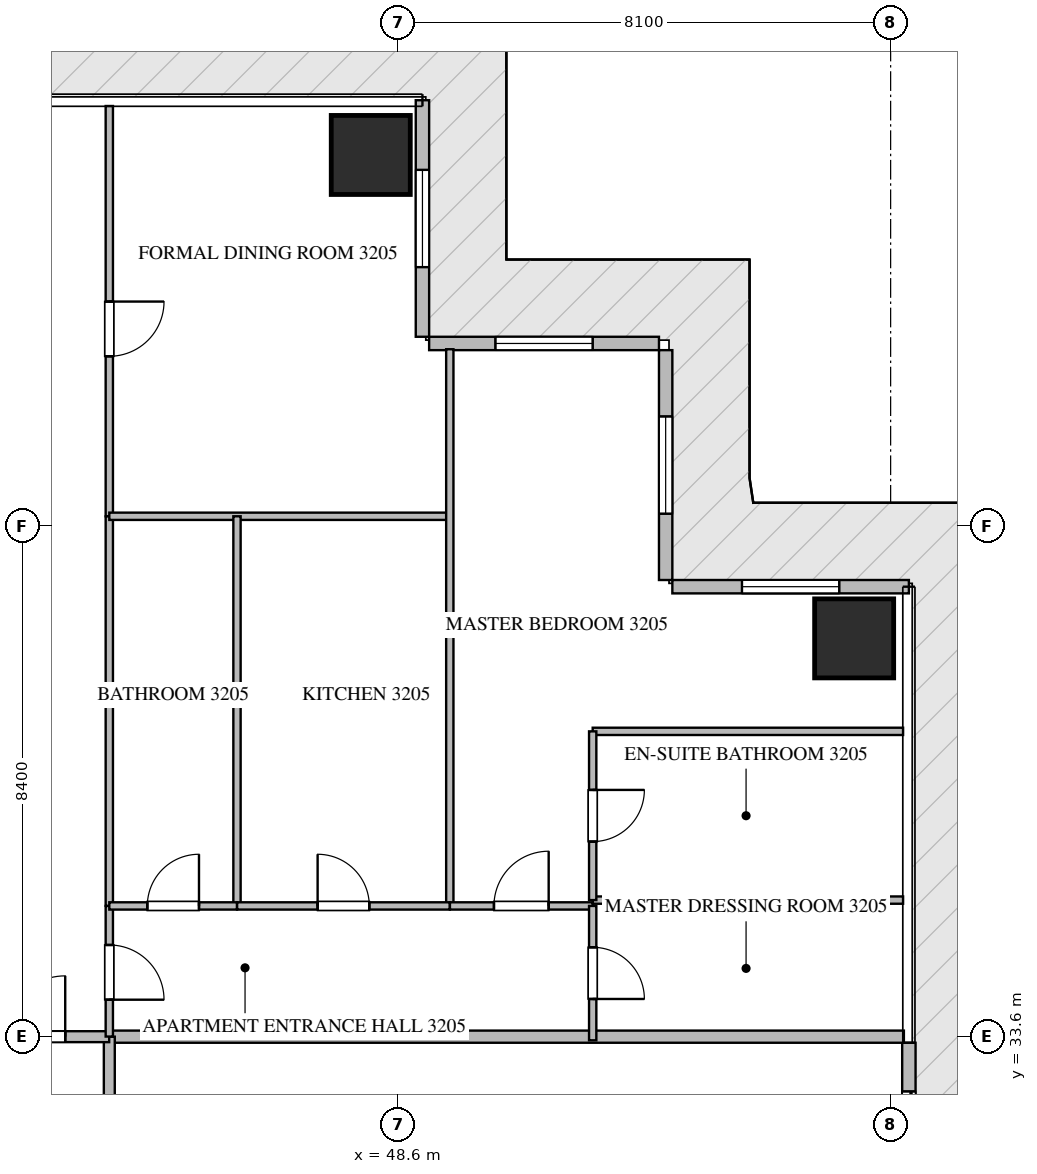
"""IFC4 building model, lengths in metres.
Left out: names, types, materials, properties, quantities, classifications, styles, units other than length and angle.
Written with IfcOpenShell. Run it as: python <this file> out.ifc"""

import sys

from ifc_helpers import new_model, si_unit, direction, frame, frame_2d, origin, origin_2d, place, context, subcontext, project, spatial, rectangle, extrude, source, transform, mapped, element, fill, save


model = new_model("IFC4")
c1 = context("Model", 3, precision=1e-05, world=origin(), true_north=direction((0.0, 1.0)))
c2 = subcontext(c1, "Body", "Model", "MODEL_VIEW")
j1 = project(units=[si_unit("LENGTHUNIT", "METRE"), si_unit("PLANEANGLEUNIT", "RADIAN")], contexts=[c1])
p1 = place(None, origin())
s1 = spatial("IfcSite", under=j1, at=p1, CompositionType="ELEMENT")
p2 = place(p1, origin())
s2 = spatial("IfcBuilding", under=s1, at=p2, CompositionType="ELEMENT")
p3 = place(p2, frame((0.0, 0.0, 131.4)))
s3 = spatial("IfcBuildingStorey", under=s2, at=p3, CompositionType="ELEMENT", Elevation=131.4)
m1 = source(origin(), c2, "Body", "SweptSolid", [
    extrude(rectangle(XDim=1.3, YDim=1.3, at=origin_2d()), origin(), (0.0, 0.0, 1.0), 3.75),
])
for number, where, z_axis, x_axis in (
    (1, (48.15, 48.1, -0.26), (0.0, 0.0, 1.0), (1.0, 0.0, 0.0)),
    (2, (56.1, 40.15, -0.26), (0.0, 0.0, 1.0), (1.0, 0.0, 0.0)),
):
    element("IfcColumn", number, at=place(p3, frame(where, z_axis=z_axis, x_axis=x_axis)), inside=s3, PredefinedType="COLUMN", context=c2, shape_type="MappedRepresentation", body=[
        mapped(m1, transform((0.0, 0.0, 0.0), scale=1.0)),
    ])
p4 = place(p3, frame((57.0, 30.5, 0.0), z_axis=(0.0, 0.0, 1.0), x_axis=(0.0, 1.0, 0.0)))
e3 = element("IfcWall", 3, at=p4, inside=s3, PredefinedType="ELEMENTEDWALL", context=c2, shape_type="SweptSolid", body=[
    extrude(rectangle(XDim=3.0, YDim=0.22, at=frame_2d((1.5, 0.0))), origin(), (0.0, 0.0, 1.0), 3.475),
])
p5 = place(p4, frame((0.8, 0.0, 0.0)))
e4 = element("IfcOpeningElement", 4, at=p5, cuts=e3, PredefinedType="OPENING", context=c2, shape_type="SweptSolid", body=[
    extrude(rectangle(XDim=1.4, YDim=2.25, at=frame_2d((0.7, 1.125))), frame((0.0, 0.12, 0.0), z_axis=(0.0, -1.0, 0.0), x_axis=(1.0, 0.0, 0.0)), (0.0, 0.0, 1.0), 0.24),
])
p6 = place(p3, frame((57.0, 41.0, 0.0), z_axis=(0.0, 0.0, 1.0), x_axis=(-1.0, 0.0, 0.0)))
e5 = element("IfcWall", 5, at=p6, inside=s3, PredefinedType="ELEMENTEDWALL", context=c2, shape_type="SweptSolid", body=[
    extrude(rectangle(XDim=3.89, YDim=0.22, at=frame_2d((1.945, 0.0))), origin(), (0.0, 0.0, 1.0), 3.475),
])
p7 = place(p6, frame((1.145, 0.0, 0.65)))
e6 = element("IfcOpeningElement", 6, at=p7, cuts=e5, PredefinedType="OPENING", context=c2, shape_type="SweptSolid", body=[
    extrude(rectangle(XDim=1.6, YDim=2.1, at=frame_2d((0.8, 1.05))), frame((0.0, 0.12, 0.0), z_axis=(0.0, -1.0, 0.0), x_axis=(1.0, 0.0, 0.0)), (0.0, 0.0, 1.0), 0.24),
])
p8 = place(p3, frame((53.0, 41.11, 0.0), z_axis=(0.0, 0.0, 1.0), x_axis=(0.0, 1.0, 0.0)))
e7 = element("IfcWall", 7, at=p8, inside=s3, PredefinedType="ELEMENTEDWALL", context=c2, shape_type="SweptSolid", body=[
    extrude(rectangle(XDim=3.78, YDim=0.22, at=frame_2d((1.89, 0.0))), origin(), (0.0, 0.0, 1.0), 3.475),
])
p9 = place(p8, frame((1.09, 0.0, 0.65)))
e8 = element("IfcOpeningElement", 8, at=p9, cuts=e7, PredefinedType="OPENING", context=c2, shape_type="SweptSolid", body=[
    extrude(rectangle(XDim=1.6, YDim=2.1, at=frame_2d((0.8, 1.05))), frame((0.0, 0.12, 0.0), z_axis=(0.0, -1.0, 0.0), x_axis=(1.0, 0.0, 0.0)), (0.0, 0.0, 1.0), 0.24),
])
p10 = place(p3, frame((52.89, 45.0, 0.0), z_axis=(0.0, 0.0, 1.0), x_axis=(-1.0, 0.0, 0.0)))
e9 = element("IfcWall", 9, at=p10, inside=s3, PredefinedType="ELEMENTEDWALL", context=c2, shape_type="SweptSolid", body=[
    extrude(rectangle(XDim=3.78, YDim=0.22, at=frame_2d((1.89, 0.0))), origin(), (0.0, 0.0, 1.0), 3.475),
])
p11 = place(p10, frame((1.09, 0.0, 0.65)))
e10 = element("IfcOpeningElement", 10, at=p11, cuts=e9, PredefinedType="OPENING", context=c2, shape_type="SweptSolid", body=[
    extrude(rectangle(XDim=1.6, YDim=2.1, at=frame_2d((0.8, 1.05))), frame((0.0, 0.12, 0.0), z_axis=(0.0, -1.0, 0.0), x_axis=(1.0, 0.0, 0.0)), (0.0, 0.0, 1.0), 0.24),
])
p12 = place(p3, frame((49.0, 45.11, 0.0), z_axis=(0.0, 0.0, 1.0), x_axis=(0.0, 1.0, 0.0)))
e11 = element("IfcWall", 11, at=p12, inside=s3, PredefinedType="ELEMENTEDWALL", context=c2, shape_type="SweptSolid", body=[
    extrude(rectangle(XDim=3.89, YDim=0.22, at=frame_2d((1.945, 0.0))), origin(), (0.0, 0.0, 1.0), 3.475),
])
p13 = place(p12, frame((1.145, 0.0, 0.65)))
e12 = element("IfcOpeningElement", 12, at=p13, cuts=e11, PredefinedType="OPENING", context=c2, shape_type="SweptSolid", body=[
    extrude(rectangle(XDim=1.6, YDim=2.1, at=frame_2d((0.8, 1.05))), frame((0.0, 0.12, 0.0), z_axis=(0.0, -1.0, 0.0), x_axis=(1.0, 0.0, 0.0)), (0.0, 0.0, 1.0), 0.24),
])
p14 = place(p3, frame((43.85, 33.6, 0.0), z_axis=(0.0, 0.0, 1.0), x_axis=(1.0, 0.0, 0.0)))
e13 = element("IfcWall", 13, at=p14, inside=s3, PredefinedType="PARTITIONING", context=c2, shape_type="SweptSolid", body=[
    extrude(rectangle(XDim=13.068, YDim=0.2, at=frame_2d((6.534, 0.0))), origin(), (0.0, 0.0, 1.0), 3.49),
])
p15 = place(p3, frame((43.85, 14.9, 0.0), z_axis=(0.0, 0.0, 1.0), x_axis=(0.0, 1.0, 0.0)))
e14 = element("IfcWall", 14, at=p15, inside=s3, PredefinedType="PARTITIONING", context=c2, shape_type="SweptSolid", body=[
    extrude(rectangle(XDim=18.7, YDim=0.18, at=frame_2d((9.35, 0.0))), origin(), (0.0, 0.0, 1.0), 3.49),
])
p16 = place(p15, frame((6.708, 0.0, 0.0)))
e15 = element("IfcOpeningElement", 15, at=p16, cuts=e14, PredefinedType="OPENING", context=c2, shape_type="SweptSolid", body=[
    extrude(rectangle(XDim=1.0, YDim=2.15, at=frame_2d((0.5, 1.075))), frame((0.0, 0.1, 0.0), z_axis=(0.0, -1.0, 0.0), x_axis=(1.0, 0.0, 0.0)), (0.0, 0.0, 1.0), 0.2),
])
p17 = place(p15, frame((15.134, 0.0, 0.0)))
e16 = element("IfcOpeningElement", 16, at=p17, cuts=e14, PredefinedType="OPENING", context=c2, shape_type="SweptSolid", body=[
    extrude(rectangle(XDim=1.0, YDim=2.15, at=frame_2d((0.5, 1.075))), frame((0.0, 0.1, 0.0), z_axis=(0.0, -1.0, 0.0), x_axis=(1.0, 0.0, 0.0)), (0.0, 0.0, 1.0), 0.2),
])
p18 = place(p3, frame((41.402, 33.6, 0.0), z_axis=(0.0, 0.0, 1.0), x_axis=(1.0, 0.0, 0.0)))
e17 = element("IfcWall", 17, at=p18, inside=s3, PredefinedType="PARTITIONING", context=c2, shape_type="SweptSolid", body=[
    extrude(rectangle(XDim=2.446, YDim=0.18, at=frame_2d((1.223, 0.0))), origin(), (0.0, 0.0, 1.0), 3.49),
])
p19 = place(p18, frame((0.723, 0.0, 0.0)))
e18 = element("IfcOpeningElement", 18, at=p19, cuts=e17, PredefinedType="OPENING", context=c2, shape_type="SweptSolid", body=[
    extrude(rectangle(XDim=1.0, YDim=2.15, at=frame_2d((0.5, 1.075))), frame((0.0, 0.1, 0.0), z_axis=(0.0, -1.0, 0.0), x_axis=(1.0, 0.0, 0.0)), (0.0, 0.0, 1.0), 0.2),
])
p20 = place(p3, frame((43.85, 35.75, 0.0), z_axis=(0.0, 0.0, 1.0), x_axis=(0.0, -1.0, 0.0)))
e19 = element("IfcWall", 19, at=p20, inside=s3, PredefinedType="PARTITIONING", context=c2, shape_type="SweptSolid", body=[
    extrude(rectangle(XDim=2.148, YDim=0.12, at=frame_2d((1.074, 0.0))), origin(), (0.0, 0.0, 1.0), 3.49),
])
p21 = place(p20, frame((0.642, 0.0, 0.0)))
e20 = element("IfcOpeningElement", 20, at=p21, cuts=e19, PredefinedType="OPENING", context=c2, shape_type="SweptSolid", body=[
    extrude(rectangle(XDim=0.9, YDim=2.1, at=frame_2d((0.45, 1.05))), frame((0.0, 0.07, 0.0), z_axis=(0.0, -1.0, 0.0), x_axis=(1.0, 0.0, 0.0)), (0.0, 0.0, 1.0), 0.14),
])
p22 = place(p3, frame((43.85, 48.905, 0.0), z_axis=(0.0, 0.0, 1.0), x_axis=(0.0, -1.0, 0.0)))
e21 = element("IfcWall", 21, at=p22, inside=s3, PredefinedType="PARTITIONING", context=c2, shape_type="SweptSolid", body=[
    extrude(rectangle(XDim=6.747, YDim=0.12, at=frame_2d((3.374, 0.0))), origin(), (0.0, 0.0, 1.0), 3.49),
])
p23 = place(p22, frame((3.216, 0.0, 0.0)))
e22 = element("IfcOpeningElement", 22, at=p23, cuts=e21, PredefinedType="OPENING", context=c2, shape_type="SweptSolid", body=[
    extrude(rectangle(XDim=0.9, YDim=2.1, at=frame_2d((0.45, 1.05))), frame((0.0, 0.07, 0.0), z_axis=(0.0, -1.0, 0.0), x_axis=(1.0, 0.0, 0.0)), (0.0, 0.0, 1.0), 0.14),
])
p24 = place(p3, frame((43.85, 42.156, 0.0), z_axis=(0.0, 0.0, 1.0), x_axis=(0.0, -1.0, 0.0)))
e23 = element("IfcWall", 23, at=p24, inside=s3, PredefinedType="PARTITIONING", context=c2, shape_type="SweptSolid", body=[
    extrude(rectangle(XDim=6.404, YDim=0.12, at=frame_2d((3.202, 0.0))), origin(), (0.0, 0.0, 1.0), 3.49),
])
p25 = place(p3, frame((43.85, 42.158, 0.0), z_axis=(0.0, 0.0, 1.0), x_axis=(1.0, 0.0, 0.0)))
e24 = element("IfcWall", 24, at=p25, inside=s3, PredefinedType="PARTITIONING", context=c2, shape_type="SweptSolid", body=[
    extrude(rectangle(XDim=5.6, YDim=0.12, at=frame_2d((2.8, 0.0))), origin(), (0.0, 0.0, 1.0), 3.49),
])
p26 = place(p3, frame((49.45, 44.905, 0.0), z_axis=(0.0, 0.0, 1.0), x_axis=(0.0, -1.0, 0.0)))
e25 = element("IfcWall", 25, at=p26, inside=s3, PredefinedType="PARTITIONING", context=c2, shape_type="SweptSolid", body=[
    extrude(rectangle(XDim=9.155, YDim=0.12, at=frame_2d((4.578, 0.0))), origin(), (0.0, 0.0, 1.0), 3.49),
])
p27 = place(p3, frame((45.95, 42.158, 0.0), z_axis=(0.0, 0.0, 1.0), x_axis=(0.0, -1.0, 0.0)))
e26 = element("IfcWall", 26, at=p27, inside=s3, PredefinedType="PARTITIONING", context=c2, shape_type="SweptSolid", body=[
    extrude(rectangle(XDim=6.408, YDim=0.12, at=frame_2d((3.204, 0.0))), origin(), (0.0, 0.0, 1.0), 3.49),
])
p28 = place(p3, frame((43.85, 35.75, 0.0), z_axis=(0.0, 0.0, 1.0), x_axis=(1.0, 0.0, 0.0)))
e27 = element("IfcWall", 27, at=p28, inside=s3, PredefinedType="PARTITIONING", context=c2, shape_type="SweptSolid", body=[
    extrude(rectangle(XDim=2.1, YDim=0.12, at=frame_2d((1.05, 0.0))), origin(), (0.0, 0.0, 1.0), 3.49),
])
p29 = place(p28, frame((0.625, 0.0, 0.0)))
e28 = element("IfcOpeningElement", 28, at=p29, cuts=e27, PredefinedType="OPENING", context=c2, shape_type="SweptSolid", body=[
    extrude(rectangle(XDim=0.85, YDim=2.1, at=frame_2d((0.425, 1.05))), frame((0.0, 0.07, 0.0), z_axis=(0.0, -1.0, 0.0), x_axis=(1.0, 0.0, 0.0)), (0.0, 0.0, 1.0), 0.14),
])
p30 = place(p3, frame((45.952, 35.75, 0.0), z_axis=(0.0, 0.0, 1.0), x_axis=(1.0, 0.0, 0.0)))
e29 = element("IfcWall", 29, at=p30, inside=s3, PredefinedType="PARTITIONING", context=c2, shape_type="SweptSolid", body=[
    extrude(rectangle(XDim=3.498, YDim=0.12, at=frame_2d((1.749, 0.0))), origin(), (0.0, 0.0, 1.0), 3.49),
])
p31 = place(p30, frame((1.324, 0.0, 0.0)))
e30 = element("IfcOpeningElement", 30, at=p31, cuts=e29, PredefinedType="OPENING", context=c2, shape_type="SweptSolid", body=[
    extrude(rectangle(XDim=0.85, YDim=2.1, at=frame_2d((0.425, 1.05))), frame((0.0, 0.07, 0.0), z_axis=(0.0, -1.0, 0.0), x_axis=(1.0, 0.0, 0.0)), (0.0, 0.0, 1.0), 0.14),
])
p32 = place(p3, frame((49.452, 35.75, 0.0), z_axis=(0.0, 0.0, 1.0), x_axis=(1.0, 0.0, 0.0)))
e31 = element("IfcWall", 31, at=p32, inside=s3, PredefinedType="PARTITIONING", context=c2, shape_type="SweptSolid", body=[
    extrude(rectangle(XDim=2.348, YDim=0.12, at=frame_2d((1.174, 0.0))), origin(), (0.0, 0.0, 1.0), 3.49),
])
p33 = place(p32, frame((0.724, 0.0, 0.0)))
e32 = element("IfcOpeningElement", 32, at=p33, cuts=e31, PredefinedType="OPENING", context=c2, shape_type="SweptSolid", body=[
    extrude(rectangle(XDim=0.9, YDim=2.1, at=frame_2d((0.45, 1.05))), frame((0.0, 0.07, 0.0), z_axis=(0.0, -1.0, 0.0), x_axis=(1.0, 0.0, 0.0)), (0.0, 0.0, 1.0), 0.14),
])
p34 = place(p3, frame((51.8, 38.621, 0.0), z_axis=(0.0, 0.0, 1.0), x_axis=(1.0, 0.0, 0.0)))
e33 = element("IfcWall", 33, at=p34, inside=s3, PredefinedType="PARTITIONING", context=c2, shape_type="SweptSolid", body=[
    extrude(rectangle(XDim=5.105, YDim=0.12, at=frame_2d((2.552, 0.0))), origin(), (0.0, 0.0, 1.0), 3.49),
])
p35 = place(p3, frame((51.802, 35.846, 0.0), z_axis=(0.0, 0.0, 1.0), x_axis=(1.0, 0.0, 0.0)))
e34 = element("IfcWall", 34, at=p35, inside=s3, PredefinedType="PARTITIONING", context=c2, shape_type="SweptSolid", body=[
    extrude(rectangle(XDim=5.103, YDim=0.12, at=frame_2d((2.552, 0.0))), origin(), (0.0, 0.0, 1.0), 3.49),
])
p36 = place(p3, frame((51.8, 38.621, 0.0), z_axis=(0.0, 0.0, 1.0), x_axis=(0.0, -1.0, 0.0)))
e35 = element("IfcWall", 35, at=p36, inside=s3, PredefinedType="PARTITIONING", context=c2, shape_type="SweptSolid", body=[
    extrude(rectangle(XDim=2.775, YDim=0.12, at=frame_2d((1.388, 0.0))), origin(), (0.0, 0.0, 1.0), 3.49),
])
p37 = place(p36, frame((0.963, 0.0, 0.0)))
e36 = element("IfcOpeningElement", 36, at=p37, cuts=e35, PredefinedType="OPENING", context=c2, shape_type="SweptSolid", body=[
    extrude(rectangle(XDim=0.85, YDim=2.1, at=frame_2d((0.425, 1.05))), frame((0.0, 0.07, 0.0), z_axis=(0.0, -1.0, 0.0), x_axis=(1.0, 0.0, 0.0)), (0.0, 0.0, 1.0), 0.14),
])
p38 = place(p3, frame((51.8, 35.75, 0.0), z_axis=(0.0, 0.0, 1.0), x_axis=(0.0, -1.0, 0.0)))
e37 = element("IfcWall", 37, at=p38, inside=s3, PredefinedType="PARTITIONING", context=c2, shape_type="SweptSolid", body=[
    extrude(rectangle(XDim=2.21, YDim=0.12, at=frame_2d((1.105, 0.0))), origin(), (0.0, 0.0, 1.0), 3.49),
])
p39 = place(p38, frame((0.68, 0.0, 0.0)))
e38 = element("IfcOpeningElement", 38, at=p39, cuts=e37, PredefinedType="OPENING", context=c2, shape_type="SweptSolid", body=[
    extrude(rectangle(XDim=0.85, YDim=2.1, at=frame_2d((0.425, 1.05))), frame((0.0, 0.07, 0.0), z_axis=(0.0, -1.0, 0.0), x_axis=(1.0, 0.0, 0.0)), (0.0, 0.0, 1.0), 0.14),
])
m2 = source(origin(), c2, "Body", "SweptSolid", [
    extrude(rectangle(XDim=1.4, YDim=2.25, at=frame_2d((0.7, 1.125))), frame((0.0, 0.025, 0.0), z_axis=(0.0, -1.0, 0.0), x_axis=(1.0, 0.0, 0.0)), (0.0, 0.0, 1.0), 0.05),
])
p40 = place(p5, origin())
e39 = element("IfcDoor", 39, at=p40, inside=s3, OperationType="SLIDING_TO_LEFT", PredefinedType="DOOR", context=c2, shape_type="MappedRepresentation", body=[
    mapped(m2, transform((0.0, 0.0, 0.0), scale=1.0)),
])
fill(e4, e39)
m3 = source(origin(), c2, "Body", "SweptSolid", [
    extrude(rectangle(XDim=1.6, YDim=2.1, at=frame_2d((0.8, 1.05))), frame((0.0, 0.03, 0.0), z_axis=(0.0, -1.0, 0.0), x_axis=(1.0, 0.0, 0.0)), (0.0, 0.0, 1.0), 0.06),
])
p41 = place(p7, origin())
e40 = element("IfcWindow", 40, at=p41, inside=s3, PartitioningType="SINGLE_PANEL", PredefinedType="WINDOW", context=c2, shape_type="MappedRepresentation", body=[
    mapped(m3, transform((0.0, 0.0, 0.0), scale=1.0)),
])
fill(e6, e40)
p42 = place(p9, origin())
e41 = element("IfcWindow", 41, at=p42, inside=s3, PartitioningType="SINGLE_PANEL", PredefinedType="WINDOW", context=c2, shape_type="MappedRepresentation", body=[
    mapped(m3, transform((0.0, 0.0, 0.0), scale=1.0)),
])
fill(e8, e41)
p43 = place(p11, origin())
e42 = element("IfcWindow", 42, at=p43, inside=s3, PartitioningType="SINGLE_PANEL", PredefinedType="WINDOW", context=c2, shape_type="MappedRepresentation", body=[
    mapped(m3, transform((0.0, 0.0, 0.0), scale=1.0)),
])
fill(e10, e42)
p44 = place(p13, origin())
e43 = element("IfcWindow", 43, at=p44, inside=s3, PartitioningType="SINGLE_PANEL", PredefinedType="WINDOW", context=c2, shape_type="MappedRepresentation", body=[
    mapped(m3, transform((0.0, 0.0, 0.0), scale=1.0)),
])
fill(e12, e43)
m4 = source(origin(), c2, "Body", "SweptSolid", [
    extrude(rectangle(XDim=1.0, YDim=2.15, at=frame_2d((0.5, 1.075))), frame((0.0, 0.025, 0.0), z_axis=(0.0, -1.0, 0.0), x_axis=(1.0, 0.0, 0.0)), (0.0, 0.0, 1.0), 0.05),
])
p45 = place(p19, origin())
e44 = element("IfcDoor", 44, at=p45, inside=s3, OperationType="SINGLE_SWING_RIGHT", PredefinedType="DOOR", context=c2, shape_type="MappedRepresentation", body=[
    mapped(m4, transform((0.0, 0.0, 0.0), scale=1.0)),
])
fill(e18, e44)
m5 = source(origin(), c2, "Body", "SweptSolid", [
    extrude(rectangle(XDim=0.9, YDim=2.1, at=frame_2d((0.45, 1.05))), frame((0.0, 0.025, 0.0), z_axis=(0.0, -1.0, 0.0), x_axis=(1.0, 0.0, 0.0)), (0.0, 0.0, 1.0), 0.05),
])
p46 = place(p21, origin())
e45 = element("IfcDoor", 45, at=p46, inside=s3, OperationType="SINGLE_SWING_RIGHT", PredefinedType="DOOR", context=c2, shape_type="MappedRepresentation", body=[
    mapped(m5, transform((0.0, 0.0, 0.0), scale=1.0)),
])
fill(e20, e45)
p47 = place(p23, origin())
e46 = element("IfcDoor", 46, at=p47, inside=s3, OperationType="SINGLE_SWING_LEFT", PredefinedType="DOOR", context=c2, shape_type="MappedRepresentation", body=[
    mapped(m5, transform((0.0, 0.0, 0.0), scale=1.0)),
])
fill(e22, e46)
m6 = source(origin(), c2, "Body", "SweptSolid", [
    extrude(rectangle(XDim=0.85, YDim=2.1, at=frame_2d((0.425, 1.05))), frame((0.0, 0.025, 0.0), z_axis=(0.0, -1.0, 0.0), x_axis=(1.0, 0.0, 0.0)), (0.0, 0.0, 1.0), 0.05),
])
p48 = place(p29, origin())
e47 = element("IfcDoor", 47, at=p48, inside=s3, OperationType="SINGLE_SWING_RIGHT", PredefinedType="DOOR", context=c2, shape_type="MappedRepresentation", body=[
    mapped(m6, transform((0.0, 0.0, 0.0), scale=1.0)),
])
fill(e28, e47)
p49 = place(p31, origin())
e48 = element("IfcDoor", 48, at=p49, inside=s3, OperationType="SINGLE_SWING_LEFT", PredefinedType="DOOR", context=c2, shape_type="MappedRepresentation", body=[
    mapped(m6, transform((0.0, 0.0, 0.0), scale=1.0)),
])
fill(e30, e48)
p50 = place(p33, origin())
e49 = element("IfcDoor", 49, at=p50, inside=s3, OperationType="SINGLE_SWING_RIGHT", PredefinedType="DOOR", context=c2, shape_type="MappedRepresentation", body=[
    mapped(m5, transform((0.0, 0.0, 0.0), scale=1.0)),
])
fill(e32, e49)
p51 = place(p37, origin())
e50 = element("IfcDoor", 50, at=p51, inside=s3, OperationType="SINGLE_SWING_LEFT", PredefinedType="DOOR", context=c2, shape_type="MappedRepresentation", body=[
    mapped(m6, transform((0.0, 0.0, 0.0), scale=1.0)),
])
fill(e36, e50)
p52 = place(p39, origin())
e51 = element("IfcDoor", 51, at=p52, inside=s3, OperationType="SINGLE_SWING_RIGHT", PredefinedType="DOOR", context=c2, shape_type="MappedRepresentation", body=[
    mapped(m6, transform((0.0, 0.0, 0.0), scale=1.0)),
])
fill(e38, e51)
save(model, sys.argv[1])
